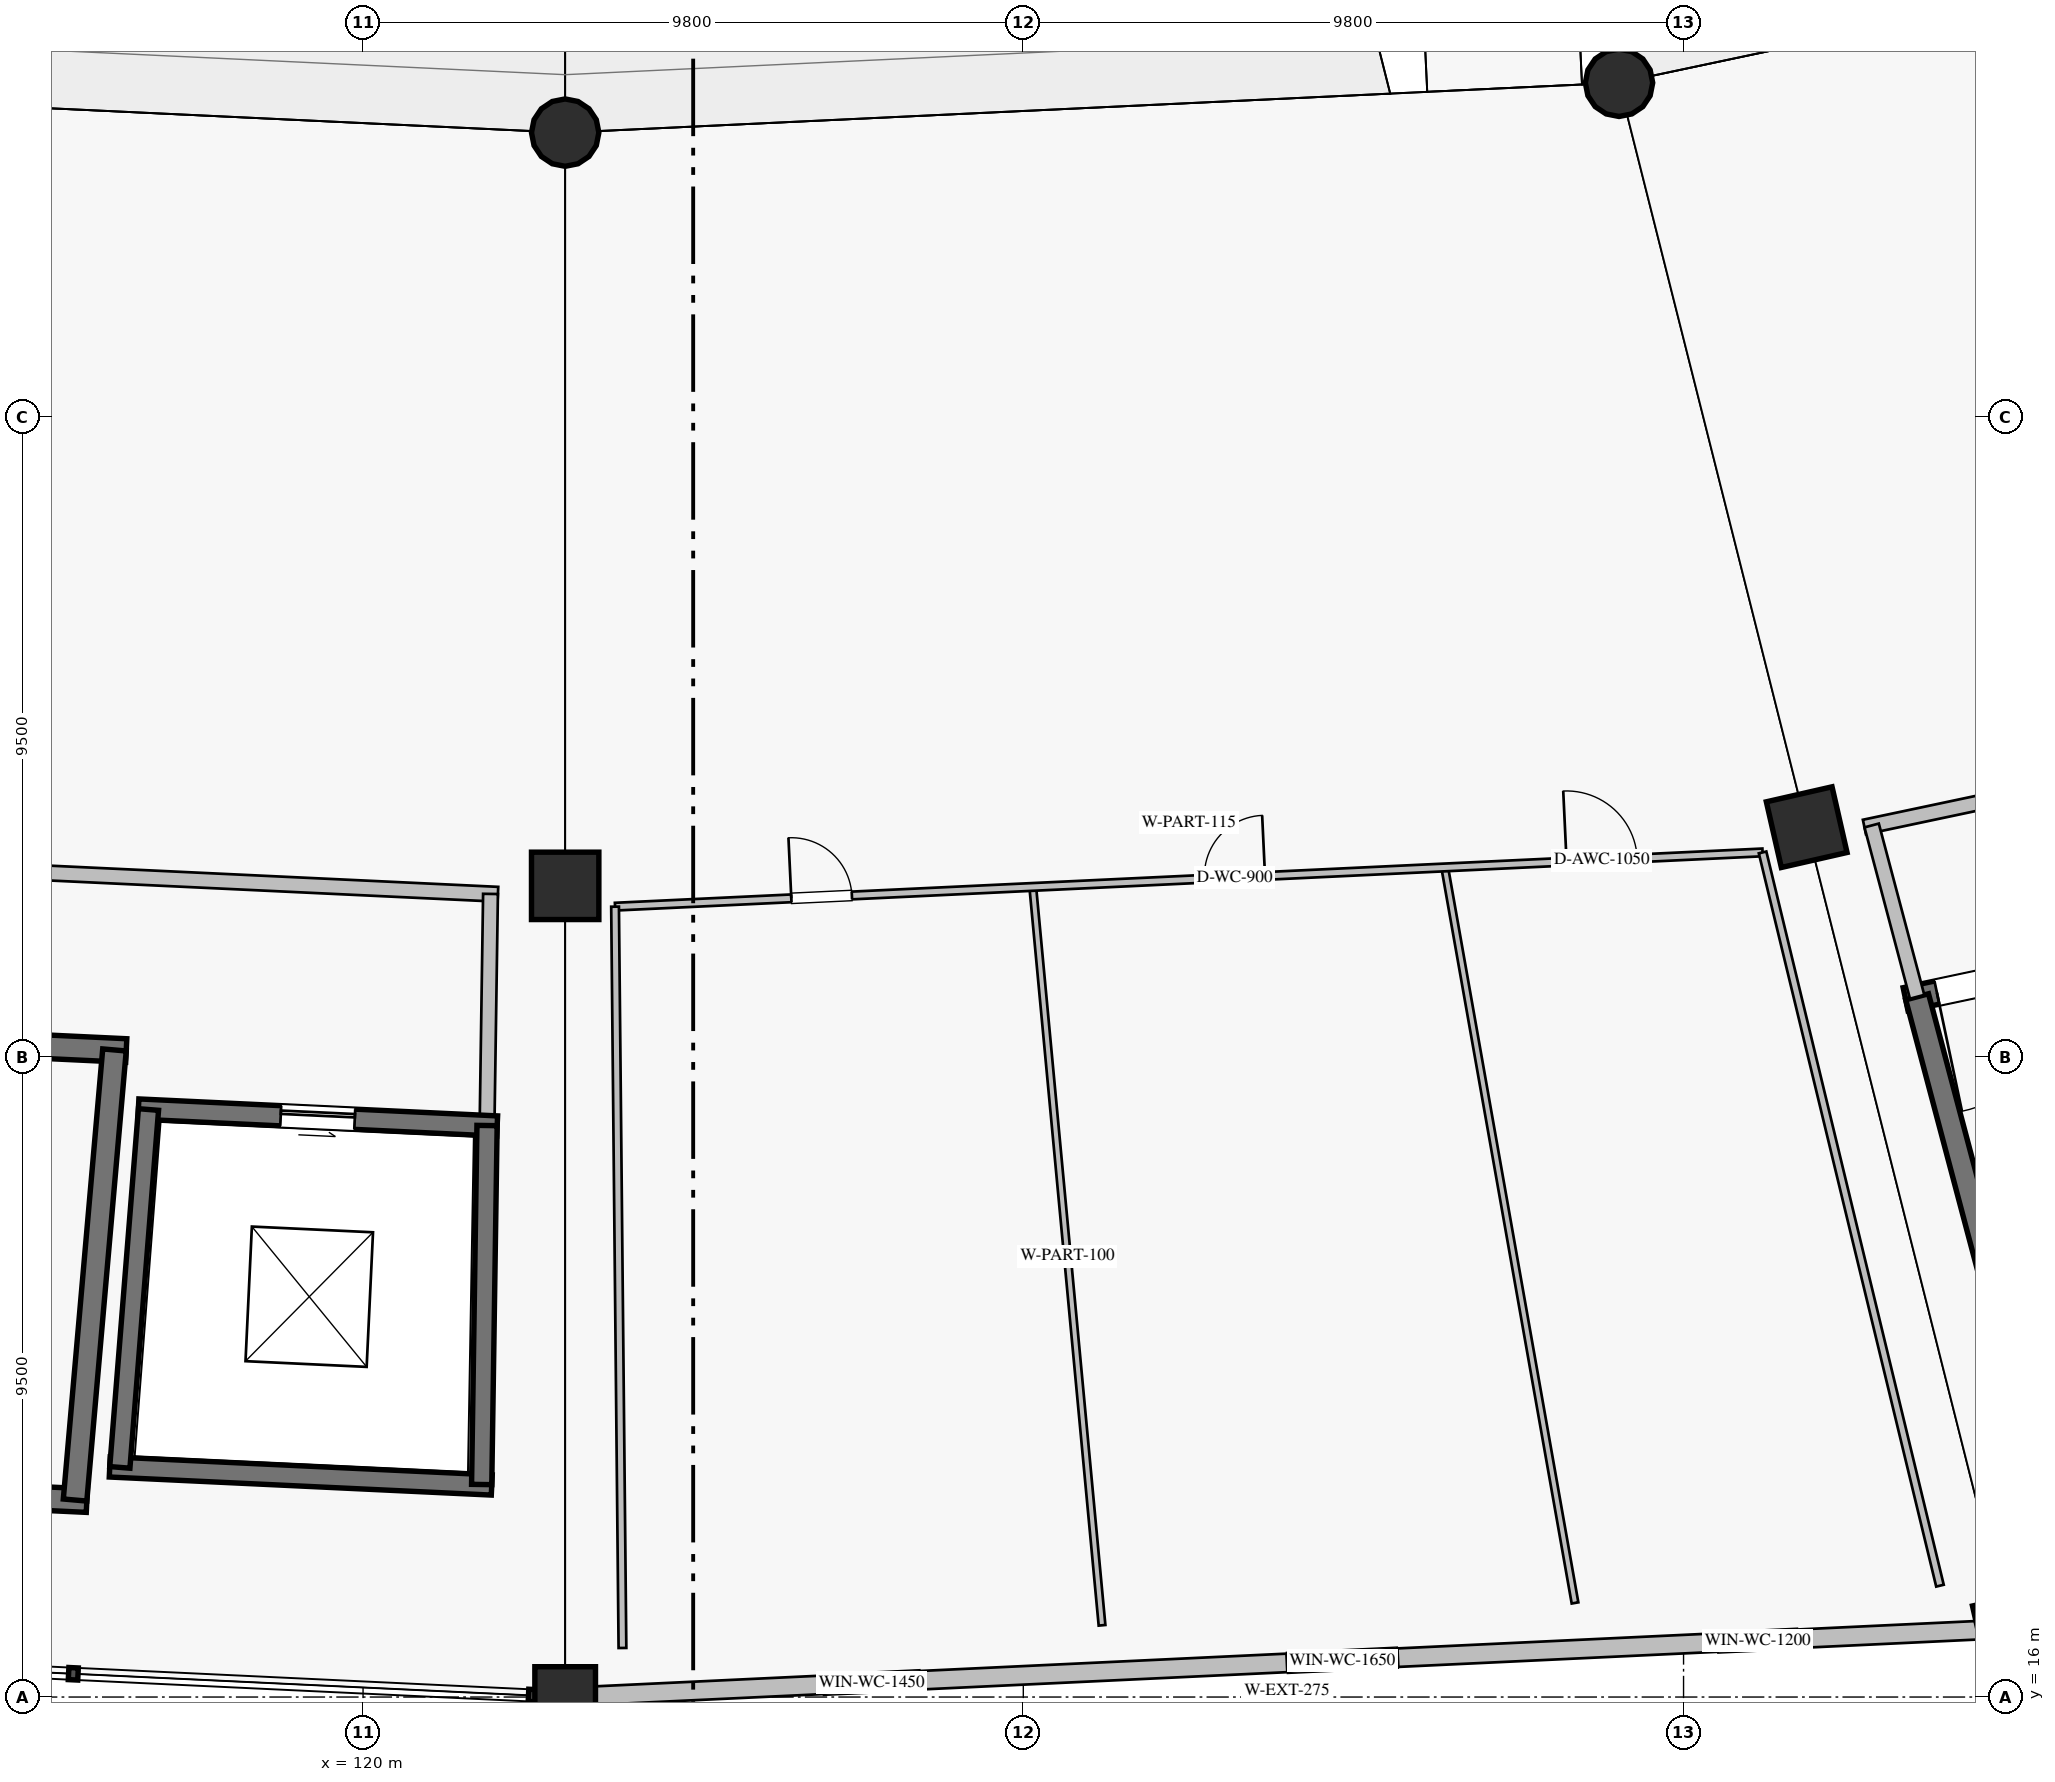
"""IFC4 building model, lengths in metres.
Left out: names, types, materials, properties, quantities, classifications, styles, units other than length and angle.
Written with IfcOpenShell. Run it as: python <this file> out.ifc"""

import sys

from ifc_helpers import new_model, si_unit, direction, frame, frame_2d, origin, origin_2d, place, context, subcontext, project, spatial, rectangle, circle, extrude, element, fill, save


model = new_model("IFC4")
c1 = context("Model", 3, precision=1e-05, world=origin(), true_north=direction((0.0, 1.0)))
c2 = subcontext(c1, "Body", "Model", "MODEL_VIEW")
j1 = project(units=[si_unit("LENGTHUNIT", "METRE"), si_unit("PLANEANGLEUNIT", "RADIAN")], contexts=[c1])
p1 = place(None, origin())
s1 = spatial("IfcSite", under=j1, at=p1, CompositionType="ELEMENT")
p2 = place(p1, origin())
s2 = spatial("IfcBuilding", under=s1, at=p2, CompositionType="ELEMENT")
p3 = place(p2, frame((0.0, 0.0, 5.78)))
s3 = spatial("IfcBuildingStorey", under=s2, at=p3, CompositionType="ELEMENT", Elevation=5.78)
for number, where, z_axis, x_axis in (
    (1, (123.0, 39.22, 0.0), (0.0, 0.0, 1.0), (0.0, -1.0, 0.0)),
    (2, (138.642, 39.96, 0.0), (0.0, 0.0, 1.0), (0.223, -0.975, 0.0)),
):
    element("IfcColumn", number, at=place(p3, frame(where, z_axis=z_axis, x_axis=x_axis)), inside=s3, PredefinedType="COLUMN", context=c2, shape_type="SweptSolid", body=[
        extrude(circle(Radius=0.5, at=origin_2d()), origin(), (0.0, 0.0, 1.0), 4.76),
    ])
for number, where, z_axis, x_axis in (
    (3, (123.0, 28.04, 0.0), (0.0, 0.0, 1.0), (0.0, -1.0, 0.0)),
    (4, (141.428, 28.911, 0.0), (0.0, 0.0, 1.0), (0.223, -0.975, 0.0)),
):
    element("IfcColumn", number, at=place(p3, frame(where, z_axis=z_axis, x_axis=x_axis)), inside=s3, PredefinedType="COLUMN", context=c2, shape_type="SweptSolid", body=[
        extrude(rectangle(XDim=1.0, YDim=1.0, at=origin_2d()), origin(), (0.0, 0.0, 1.0), 4.76),
    ])
for number, where, z_axis, x_axis in (
    (5, (123.0, 16.0, 0.0), (0.0, 0.0, 1.0), (0.0, -1.0, 0.0)),
    (6, (144.428, 17.013, 0.0), (0.0, 0.0, 1.0), (0.223, -0.975, 0.0)),
):
    element("IfcColumn", number, at=place(p3, frame(where, z_axis=z_axis, x_axis=x_axis)), inside=s3, PredefinedType="COLUMN", context=c2, shape_type="SweptSolid", body=[
        extrude(rectangle(XDim=0.9, YDim=0.9, at=origin_2d()), origin(), (0.0, 0.0, 1.0), 4.76),
    ])
p4 = place(p3, frame((123.439, 16.021, 0.0), z_axis=(0.0, 0.0, 1.0), x_axis=(0.998883870553, 0.047233601901, 0.0)))
e7 = element("IfcWall", 7, at=p4, inside=s3, PredefinedType="SOLIDWALL", context=c2, shape_type="SweptSolid", body=[
    extrude(rectangle(XDim=20.572, YDim=0.275, at=frame_2d((10.286, 0.0))), origin(), (0.0, 0.0, 1.0), 3.798),
])
p5 = place(p4, frame((3.389, 0.0, 1.65)))
e8 = element("IfcOpeningElement", 8, at=p5, cuts=e7, PredefinedType="OPENING", context=c2, shape_type="SweptSolid", body=[
    extrude(rectangle(XDim=1.45, YDim=0.95, at=frame_2d((0.725, 0.475))), frame((0.0, 0.147, 0.0), z_axis=(0.0, -1.0, 0.0), x_axis=(1.0, 0.0, 0.0)), (0.0, 0.0, 1.0), 0.295),
])
p6 = place(p4, frame((10.284, 0.0, 1.65)))
e9 = element("IfcOpeningElement", 9, at=p6, cuts=e7, PredefinedType="OPENING", context=c2, shape_type="SweptSolid", body=[
    extrude(rectangle(XDim=1.65, YDim=1.0, at=frame_2d((0.825, 0.5))), frame((0.0, 0.147, 0.0), z_axis=(0.0, -1.0, 0.0), x_axis=(1.0, 0.0, 0.0)), (0.0, 0.0, 1.0), 0.295),
])
p7 = place(p4, frame((16.68, 0.0, 1.65)))
e10 = element("IfcOpeningElement", 10, at=p7, cuts=e7, PredefinedType="OPENING", context=c2, shape_type="SweptSolid", body=[
    extrude(rectangle(XDim=1.2, YDim=0.9, at=frame_2d((0.6, 0.45))), frame((0.0, 0.147, 0.0), z_axis=(0.0, -1.0, 0.0), x_axis=(1.0, 0.0, 0.0)), (0.0, 0.0, 1.0), 0.295),
])
p8 = place(p3, frame((104.667, 26.155, 0.0), z_axis=(0.0, 0.0, 1.0), x_axis=(0.998883770468, -0.04723571843, 0.0)))
e11 = element("IfcWall", 11, at=p8, inside=s3, PredefinedType="SHEAR", context=c2, shape_type="SweptSolid", body=[
    extrude(rectangle(XDim=11.831, YDim=0.35, at=frame_2d((5.916, 0.0))), origin(), (0.0, 0.0, 1.0), 4.5),
])
p9 = place(p8, frame((0.475, 0.0, 0.0)))
e12 = element("IfcOpeningElement", 12, at=p9, cuts=e11, PredefinedType="OPENING", context=c2, shape_type="SweptSolid", body=[
    extrude(rectangle(XDim=1.8, YDim=2.2, at=frame_2d((0.9, 1.1))), frame((0.0, 0.185, 0.0), z_axis=(0.0, -1.0, 0.0), x_axis=(1.0, 0.0, 0.0)), (0.0, 0.0, 1.0), 0.37),
])
p10 = place(p3, frame((103.08, 19.522, 0.0), z_axis=(0.0, 0.0, 1.0), x_axis=(0.998884004857, -0.047230761603, 0.0)))
e13 = element("IfcWall", 13, at=p10, inside=s3, PredefinedType="SHEAR", context=c2, shape_type="SweptSolid", body=[
    extrude(rectangle(XDim=12.835, YDim=0.35, at=frame_2d((6.417, 0.0))), origin(), (0.0, 0.0, 1.0), 4.5),
])
p11 = place(p3, frame((116.31, 25.604, 0.0), z_axis=(0.0, 0.0, 1.0), x_axis=(-0.087232889326, -0.996187945631, 0.0)))
e14 = element("IfcWall", 14, at=p11, inside=s3, PredefinedType="SHEAR", context=c2, shape_type="SweptSolid", body=[
    extrude(rectangle(XDim=6.706, YDim=0.35, at=frame_2d((3.353, 0.0))), origin(), (0.0, 0.0, 1.0), 4.5),
])
p12 = place(p3, frame((116.665, 24.728, 0.0), z_axis=(0.0, 0.0, 1.0), x_axis=(0.998882494219, -0.047262699282, 0.0)))
e15 = element("IfcWall", 15, at=p12, inside=s3, PredefinedType="SHEAR", context=c2, shape_type="SweptSolid", body=[
    extrude(rectangle(XDim=5.331, YDim=0.3, at=frame_2d((2.666, 0.0))), origin(), (0.0, 0.0, 1.0), 4.5),
])
p13 = place(p12, frame((2.115, 0.0, 0.0)))
e16 = element("IfcOpeningElement", 16, at=p13, cuts=e15, PredefinedType="OPENING", context=c2, shape_type="SweptSolid", body=[
    extrude(rectangle(XDim=1.1, YDim=2.2, at=frame_2d((0.55, 1.1))), frame((0.0, 0.16, 0.0), z_axis=(0.0, -1.0, 0.0), x_axis=(1.0, 0.0, 0.0)), (0.0, 0.0, 1.0), 0.32),
])
p14 = place(p3, frame((116.24, 19.416, 0.0), z_axis=(0.0, 0.0, 1.0), x_axis=(0.998884329444, -0.047223896393, 0.0)))
e17 = element("IfcWall", 17, at=p14, inside=s3, PredefinedType="SHEAR", context=c2, shape_type="SweptSolid", body=[
    extrude(rectangle(XDim=5.677, YDim=0.3, at=frame_2d((2.838, 0.0))), origin(), (0.0, 0.0, 1.0), 4.5),
])
p15 = place(p3, frame((116.815, 24.72, 0.0), z_axis=(0.0, 0.0, 1.0), x_axis=(-0.079807132276, -0.996810323802, 0.0)))
e18 = element("IfcWall", 18, at=p15, inside=s3, PredefinedType="SHEAR", context=c2, shape_type="SweptSolid", body=[
    extrude(rectangle(XDim=5.329, YDim=0.3, at=frame_2d((2.665, 0.0))), origin(), (0.0, 0.0, 1.0), 4.5),
])
p16 = place(p3, frame((121.84, 24.483, 0.0), z_axis=(0.0, 0.0, 1.0), x_axis=(-0.014935332807, -0.999888461697, 0.0)))
e19 = element("IfcWall", 19, at=p16, inside=s3, PredefinedType="SHEAR", context=c2, shape_type="SweptSolid", body=[
    extrude(rectangle(XDim=5.329, YDim=0.3, at=frame_2d((2.665, 0.0))), origin(), (0.0, 0.0, 1.0), 4.5),
])
p17 = place(p3, frame((105.343, 28.703, 0.0), z_axis=(0.0, 0.0, 1.0), x_axis=(0.998884242682, -0.047225731555, 0.0)))
e20 = element("IfcWall", 20, at=p17, inside=s3, PredefinedType="SOLIDWALL", context=c2, shape_type="SweptSolid", body=[
    extrude(rectangle(XDim=16.677, YDim=0.22, at=frame_2d((8.339, 0.0))), origin(), (0.0, 0.0, 1.0), 3.448),
])
p18 = place(p17, frame((6.766, 0.0, 0.0)))
e21 = element("IfcOpeningElement", 21, at=p18, cuts=e20, PredefinedType="OPENING", context=c2, shape_type="SweptSolid", body=[
    extrude(rectangle(XDim=1.5, YDim=2.2, at=frame_2d((0.75, 1.1))), frame((0.0, 0.12, 0.0), z_axis=(0.0, -1.0, 0.0), x_axis=(1.0, 0.0, 0.0)), (0.0, 0.0, 1.0), 0.24),
])
p19 = place(p3, frame((121.892, 27.92, 0.0), z_axis=(0.0, 0.0, 1.0), x_axis=(-0.014984113027, -0.999887731876, 0.0)))
e22 = element("IfcWall", 22, at=p19, inside=s3, PredefinedType="SOLIDWALL", context=c2, shape_type="SweptSolid", body=[
    extrude(rectangle(XDim=3.438, YDim=0.22, at=frame_2d((1.719, 0.0))), origin(), (0.0, 0.0, 1.0), 4.5),
])
p20 = place(p3, frame((142.896, 26.357, 0.0), z_axis=(0.0, 0.0, 1.0), x_axis=(0.978345203961, 0.206979858648, 0.0)))
e23 = element("IfcWall", 23, at=p20, inside=s3, PredefinedType="SHEAR", context=c2, shape_type="SweptSolid", body=[
    extrude(rectangle(XDim=12.044, YDim=0.35, at=frame_2d((6.022, 0.0))), origin(), (0.0, 0.0, 1.0), 4.5),
])
p21 = place(p20, frame((0.475, 0.0, 0.0)))
e24 = element("IfcOpeningElement", 24, at=p21, cuts=e23, PredefinedType="OPENING", context=c2, shape_type="SweptSolid", body=[
    extrude(rectangle(XDim=1.8, YDim=2.2, at=frame_2d((0.9, 1.1))), frame((0.0, 0.185, 0.0), z_axis=(0.0, -1.0, 0.0), x_axis=(1.0, 0.0, 0.0)), (0.0, 0.0, 1.0), 0.37),
])
p22 = place(p3, frame((143.067, 26.394, 0.0), z_axis=(0.0, 0.0, 1.0), x_axis=(0.256518400663, -0.966539347425, 0.0)))
e25 = element("IfcWall", 25, at=p22, inside=s3, PredefinedType="SHEAR", context=c2, shape_type="SweptSolid", body=[
    extrude(rectangle(XDim=6.84, YDim=0.35, at=frame_2d((3.42, 0.0))), origin(), (0.0, 0.0, 1.0), 4.5),
])
p23 = place(p3, frame((142.284, 28.914, 0.0), z_axis=(0.0, 0.0, 1.0), x_axis=(0.97834522483, 0.206979760008, 0.0)))
e26 = element("IfcWall", 26, at=p23, inside=s3, PredefinedType="SOLIDWALL", context=c2, shape_type="SweptSolid", body=[
    extrude(rectangle(XDim=16.983, YDim=0.22, at=frame_2d((8.491, 0.0))), origin(), (0.0, 0.0, 1.0), 3.448),
])
p24 = place(p23, frame((6.903, 0.0, 0.0)))
e27 = element("IfcOpeningElement", 27, at=p24, cuts=e26, PredefinedType="OPENING", context=c2, shape_type="SweptSolid", body=[
    extrude(rectangle(XDim=1.5, YDim=2.2, at=frame_2d((0.75, 1.1))), frame((0.0, 0.12, 0.0), z_axis=(0.0, -1.0, 0.0), x_axis=(1.0, 0.0, 0.0)), (0.0, 0.0, 1.0), 0.24),
])
p25 = place(p3, frame((142.392, 28.936, 0.0), z_axis=(0.0, 0.0, 1.0), x_axis=(0.256507243456, -0.966542308466, 0.0)))
e28 = element("IfcWall", 28, at=p25, inside=s3, PredefinedType="SOLIDWALL", context=c2, shape_type="SweptSolid", body=[
    extrude(rectangle(XDim=2.631, YDim=0.22, at=frame_2d((1.315, 0.0))), origin(), (0.0, 0.0, 1.0), 4.5),
])
p26 = place(p3, frame((123.74, 27.731, 0.0), z_axis=(0.0, 0.0, 1.0), x_axis=(0.998883826153, 0.047234540851, 0.0)))
e29 = element("IfcWall", 29, at=p26, inside=s3, PredefinedType="PARTITIONING", context=c2, shape_type="SweptSolid", body=[
    extrude(rectangle(XDim=17.052, YDim=0.115, at=frame_2d((8.526, 0.0))), origin(), (0.0, 0.0, 1.0), 3.82),
])
p27 = place(p26, frame((2.619, 0.0, 0.0)))
e30 = element("IfcOpeningElement", 30, at=p27, cuts=e29, PredefinedType="OPENING", context=c2, shape_type="SweptSolid", body=[
    extrude(rectangle(XDim=0.9, YDim=2.1, at=frame_2d((0.45, 1.05))), frame((0.0, 0.067, 0.0), z_axis=(0.0, -1.0, 0.0), x_axis=(1.0, 0.0, 0.0)), (0.0, 0.0, 1.0), 0.135),
])
p28 = place(p26, frame((8.758, 0.0, 0.0)))
e31 = element("IfcOpeningElement", 31, at=p28, cuts=e29, PredefinedType="OPENING", context=c2, shape_type="SweptSolid", body=[
    extrude(rectangle(XDim=0.9, YDim=2.1, at=frame_2d((0.45, 1.05))), frame((0.0, 0.067, 0.0), z_axis=(0.0, -1.0, 0.0), x_axis=(1.0, 0.0, 0.0)), (0.0, 0.0, 1.0), 0.135),
])
p29 = place(p26, frame((14.139, 0.0, 0.0)))
e32 = element("IfcOpeningElement", 32, at=p29, cuts=e29, PredefinedType="OPENING", context=c2, shape_type="SweptSolid", body=[
    extrude(rectangle(XDim=1.05, YDim=2.1, at=frame_2d((0.525, 1.05))), frame((0.0, 0.067, 0.0), z_axis=(0.0, -1.0, 0.0), x_axis=(1.0, 0.0, 0.0)), (0.0, 0.0, 1.0), 0.135),
])
p30 = place(p3, frame((123.74, 27.731, 0.0), z_axis=(0.0, 0.0, 1.0), x_axis=(0.00998463551, -0.999950152284, 0.0)))
e33 = element("IfcWall", 33, at=p30, inside=s3, PredefinedType="PARTITIONING", context=c2, shape_type="SweptSolid", body=[
    extrude(rectangle(XDim=11.003, YDim=0.115, at=frame_2d((5.501, 0.0))), origin(), (0.0, 0.0, 1.0), 3.82),
])
p31 = place(p3, frame((140.773, 28.536, 0.0), z_axis=(0.0, 0.0, 1.0), x_axis=(0.235146333041, -0.971959979658, 0.0)))
e34 = element("IfcWall", 34, at=p31, inside=s3, PredefinedType="PARTITIONING", context=c2, shape_type="SweptSolid", body=[
    extrude(rectangle(XDim=11.198, YDim=0.115, at=frame_2d((5.599, 0.0))), origin(), (0.0, 0.0, 1.0), 3.82),
])
p32 = place(p3, frame((129.94, 28.024, 0.0), z_axis=(0.0, 0.0, 1.0), x_axis=(0.09339704784, -0.995628942656, 0.0)))
e35 = element("IfcWall", 35, at=p32, inside=s3, PredefinedType="PARTITIONING", context=c2, shape_type="SweptSolid", body=[
    extrude(rectangle(XDim=11.008, YDim=0.1, at=frame_2d((5.504, 0.0))), origin(), (0.0, 0.0, 1.0), 3.82),
])
p33 = place(p3, frame((136.055, 28.313, 0.0), z_axis=(0.0, 0.0, 1.0), x_axis=(0.174453621557, -0.984665391859, 0.0)))
e36 = element("IfcWall", 36, at=p33, inside=s3, PredefinedType="PARTITIONING", context=c2, shape_type="SweptSolid", body=[
    extrude(rectangle(XDim=11.086, YDim=0.1, at=frame_2d((5.543, 0.0))), origin(), (0.0, 0.0, 1.0), 3.82),
])
p34 = place(p5, origin())
e37 = element("IfcWindow", 37, at=p34, inside=s3, PartitioningType="SINGLE_PANEL", PredefinedType="WINDOW", context=c2, shape_type="SweptSolid", body=[
    extrude(rectangle(XDim=1.45, YDim=0.95, at=frame_2d((0.725, 0.475))), frame((0.0, 0.03, 0.0), z_axis=(0.0, -1.0, 0.0), x_axis=(1.0, 0.0, 0.0)), (0.0, 0.0, 1.0), 0.06),
])
fill(e8, e37)
p35 = place(p6, origin())
e38 = element("IfcWindow", 38, at=p35, inside=s3, PartitioningType="SINGLE_PANEL", PredefinedType="WINDOW", context=c2, shape_type="SweptSolid", body=[
    extrude(rectangle(XDim=1.65, YDim=1.0, at=frame_2d((0.825, 0.5))), frame((0.0, 0.03, 0.0), z_axis=(0.0, -1.0, 0.0), x_axis=(1.0, 0.0, 0.0)), (0.0, 0.0, 1.0), 0.06),
])
fill(e9, e38)
p36 = place(p7, origin())
e39 = element("IfcWindow", 39, at=p36, inside=s3, PartitioningType="SINGLE_PANEL", PredefinedType="WINDOW", context=c2, shape_type="SweptSolid", body=[
    extrude(rectangle(XDim=1.2, YDim=0.9, at=frame_2d((0.6, 0.45))), frame((0.0, 0.03, 0.0), z_axis=(0.0, -1.0, 0.0), x_axis=(1.0, 0.0, 0.0)), (0.0, 0.0, 1.0), 0.06),
])
fill(e10, e39)
p37 = place(p13, origin())
e40 = element("IfcDoor", 40, at=p37, inside=s3, OperationType="SLIDING_TO_RIGHT", PredefinedType="DOOR", context=c2, shape_type="SweptSolid", body=[
    extrude(rectangle(XDim=1.1, YDim=2.2, at=frame_2d((0.55, 1.1))), frame((0.0, 0.025, 0.0), z_axis=(0.0, -1.0, 0.0), x_axis=(1.0, 0.0, 0.0)), (0.0, 0.0, 1.0), 0.05),
])
fill(e16, e40)
p38 = place(p21, frame((1.8, 0.0, 0.0), z_axis=(0.0, 0.0, 1.0), x_axis=(-1.0, 0.0, 0.0)))
e41 = element("IfcDoor", 41, at=p38, inside=s3, OperationType="SINGLE_SWING_RIGHT", PredefinedType="DOOR", context=c2, shape_type="SweptSolid", body=[
    extrude(rectangle(XDim=1.8, YDim=2.2, at=frame_2d((0.9, 1.1))), frame((0.0, 0.025, 0.0), z_axis=(0.0, -1.0, 0.0), x_axis=(1.0, 0.0, 0.0)), (0.0, 0.0, 1.0), 0.05),
])
fill(e24, e41)
p39 = place(p27, origin())
e42 = element("IfcDoor", 42, at=p39, inside=s3, OperationType="SINGLE_SWING_LEFT", PredefinedType="DOOR", context=c2, shape_type="SweptSolid", body=[
    extrude(rectangle(XDim=0.9, YDim=2.1, at=frame_2d((0.45, 1.05))), frame((0.0, 0.025, 0.0), z_axis=(0.0, -1.0, 0.0), x_axis=(1.0, 0.0, 0.0)), (0.0, 0.0, 1.0), 0.05),
])
fill(e30, e42)
p40 = place(p28, origin())
e43 = element("IfcDoor", 43, at=p40, inside=s3, OperationType="SINGLE_SWING_RIGHT", PredefinedType="DOOR", context=c2, shape_type="SweptSolid", body=[
    extrude(rectangle(XDim=0.9, YDim=2.1, at=frame_2d((0.45, 1.05))), frame((0.0, 0.025, 0.0), z_axis=(0.0, -1.0, 0.0), x_axis=(1.0, 0.0, 0.0)), (0.0, 0.0, 1.0), 0.05),
])
fill(e31, e43)
p41 = place(p29, origin())
e44 = element("IfcDoor", 44, at=p41, inside=s3, OperationType="SINGLE_SWING_LEFT", PredefinedType="DOOR", context=c2, shape_type="SweptSolid", body=[
    extrude(rectangle(XDim=1.05, YDim=2.1, at=frame_2d((0.525, 1.05))), frame((0.0, 0.025, 0.0), z_axis=(0.0, -1.0, 0.0), x_axis=(1.0, 0.0, 0.0)), (0.0, 0.0, 1.0), 0.05),
])
fill(e32, e44)
save(model, sys.argv[1])
